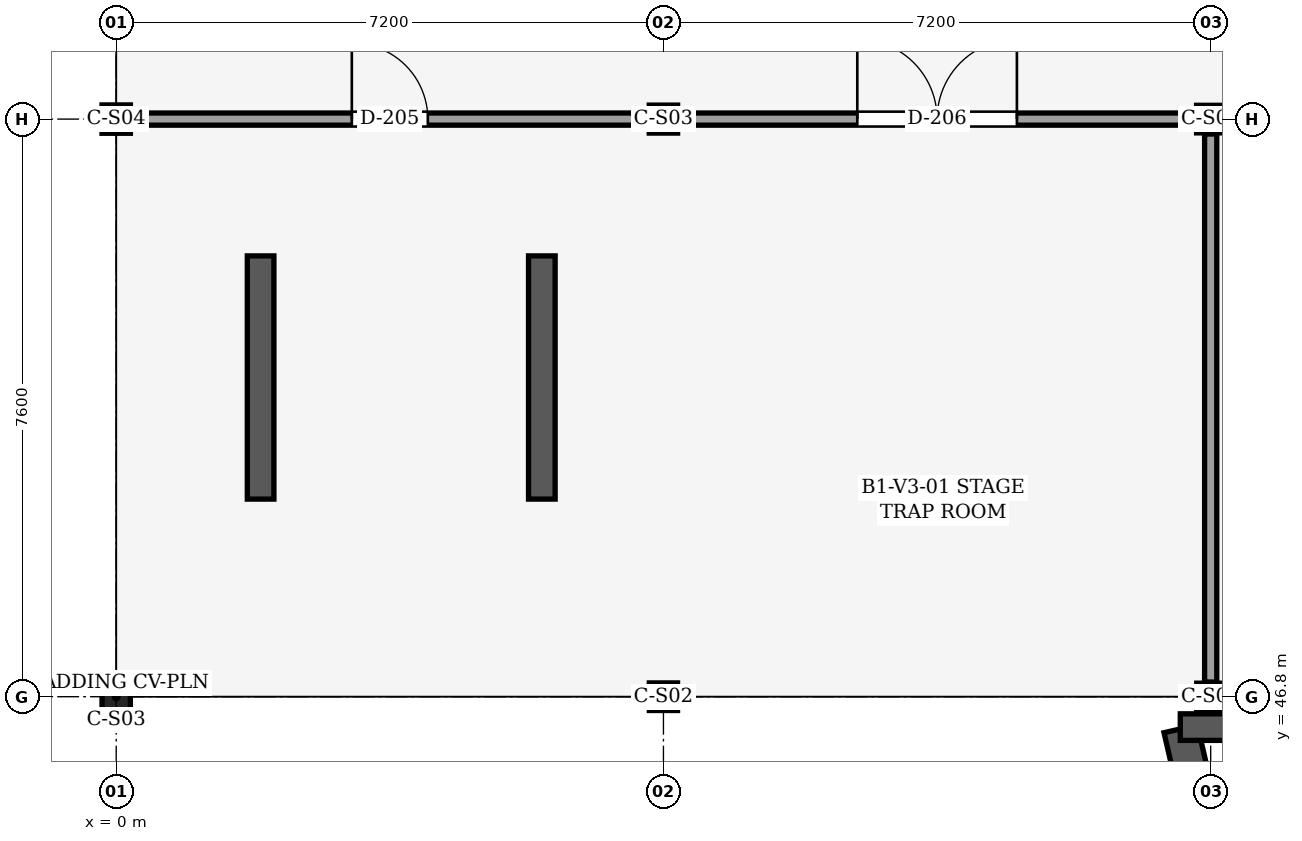
"""IFC4 building model, lengths in metres.
Left out: names, types, materials, properties, quantities, classifications, styles, units other than length and angle.
Written with IfcOpenShell. Run it as: python <this file> out.ifc"""

import sys

from ifc_helpers import new_model, si_unit, direction, frame, frame_2d, origin, origin_2d, place, context, subcontext, project, spatial, rectangle, i_section, extrude, element, fill, save


model = new_model("IFC4")
c1 = context("Model", 3, precision=1e-05, world=origin(), true_north=direction((0.0, 1.0)))
c2 = subcontext(c1, "Body", "Model", "MODEL_VIEW")
j1 = project(units=[si_unit("LENGTHUNIT", "METRE"), si_unit("PLANEANGLEUNIT", "RADIAN")], contexts=[c1])
p1 = place(None, origin())
s1 = spatial("IfcSite", under=j1, at=p1, CompositionType="ELEMENT")
p2 = place(p1, origin())
s2 = spatial("IfcBuilding", under=s1, at=p2, CompositionType="ELEMENT")
p3 = place(p2, frame((0.0, 0.0, -5.4)))
s3 = spatial("IfcBuildingStorey", under=s2, at=p3, CompositionType="ELEMENT", Elevation=-5.4)
p4 = place(p3, frame((0.0, 46.8, 0.0), z_axis=(0.0, 0.0, 1.0), x_axis=(1.0, 0.0, 0.0)))
e1 = element("IfcColumn", 1, at=p4, inside=s3, PredefinedType="COLUMN", context=c2, shape_type="SweptSolid", body=[
    extrude(i_section(OverallWidth=0.373, OverallDepth=0.368, WebThickness=0.015, FlangeThickness=0.024, FilletRadius=0.025, at=origin_2d()), origin(), (0.0, 0.0, 1.0), 5.4),
])
p5 = place(p3, frame((0.0, 54.4, 0.0), z_axis=(0.0, 0.0, 1.0), x_axis=(1.0, 0.0, 0.0)))
e2 = element("IfcColumn", 2, at=p5, inside=s3, PredefinedType="COLUMN", context=c2, shape_type="SweptSolid", body=[
    extrude(i_section(OverallWidth=0.373, OverallDepth=0.373, WebThickness=0.016, FlangeThickness=0.026, FilletRadius=0.025, at=origin_2d()), origin(), (0.0, 0.0, 1.0), 5.4),
])
p6 = place(p3, frame((7.2, 46.8, 0.0), z_axis=(0.0, 0.0, 1.0), x_axis=(1.0, 0.0, 0.0)))
e3 = element("IfcColumn", 3, at=p6, inside=s3, PredefinedType="COLUMN", context=c2, shape_type="SweptSolid", body=[
    extrude(i_section(OverallWidth=0.371, OverallDepth=0.363, WebThickness=0.013, FlangeThickness=0.022, FilletRadius=0.025, at=origin_2d()), origin(), (0.0, 0.0, 1.0), 5.4),
])
p7 = place(p3, frame((7.2, 54.4, 0.0), z_axis=(0.0, 0.0, 1.0), x_axis=(1.0, 0.0, 0.0)))
e4 = element("IfcColumn", 4, at=p7, inside=s3, PredefinedType="COLUMN", context=c2, shape_type="SweptSolid", body=[
    extrude(i_section(OverallWidth=0.373, OverallDepth=0.368, WebThickness=0.015, FlangeThickness=0.024, FilletRadius=0.025, at=origin_2d()), origin(), (0.0, 0.0, 1.0), 5.4),
])
p8 = place(p3, frame((14.4, 46.8, 0.0), z_axis=(0.0, 0.0, 1.0), x_axis=(1.0, 0.0, 0.0)))
e5 = element("IfcColumn", 5, at=p8, inside=s3, PredefinedType="COLUMN", context=c2, shape_type="SweptSolid", body=[
    extrude(i_section(OverallWidth=0.368, OverallDepth=0.356, WebThickness=0.011, FlangeThickness=0.018, FilletRadius=0.025, at=origin_2d()), origin(), (0.0, 0.0, 1.0), 5.4),
])
p9 = place(p3, frame((14.4, 54.4, 0.0), z_axis=(0.0, 0.0, 1.0), x_axis=(1.0, 0.0, 0.0)))
e6 = element("IfcColumn", 6, at=p9, inside=s3, PredefinedType="COLUMN", context=c2, shape_type="SweptSolid", body=[
    extrude(i_section(OverallWidth=0.371, OverallDepth=0.363, WebThickness=0.013, FlangeThickness=0.022, FilletRadius=0.025, at=origin_2d()), origin(), (0.0, 0.0, 1.0), 5.4),
])
p10 = place(p3, frame((14.005, 46.377, -0.45), z_axis=(0.0, 0.0, 1.0), x_axis=(0.224861740746, -0.974390680143, 0.0)))
e7 = element("IfcWall", 7, at=p10, inside=s3, PredefinedType="USERDEFINED", context=c2, shape_type="SweptSolid", body=[
    extrude(rectangle(XDim=7.981, YDim=0.45, at=frame_2d((3.991, 0.0))), origin(), (0.0, 0.0, 1.0), 5.6),
])
p11 = place(p3, frame((21.45, 46.4, -0.45), z_axis=(0.0, 0.0, 1.0), x_axis=(-1.0, 0.0, 0.0)))
e8 = element("IfcWall", 8, at=p11, inside=s3, PredefinedType="USERDEFINED", context=c2, shape_type="SweptSolid", body=[
    extrude(rectangle(XDim=7.45, YDim=0.35, at=frame_2d((3.725, 0.0))), origin(), (0.0, 0.0, 1.0), 5.6),
])
for number, where, z_axis, x_axis in (
    (9, (1.9, 49.4, 0.0), (0.0, 0.0, 1.0), (0.0, 1.0, 0.0)),
    (10, (5.6, 49.4, 0.0), (0.0, 0.0, 1.0), (0.0, 1.0, 0.0)),
):
    element("IfcWall", number, at=place(p3, frame(where, z_axis=z_axis, x_axis=x_axis)), inside=s3, PredefinedType="USERDEFINED", context=c2, shape_type="SweptSolid", body=[
        extrude(rectangle(XDim=3.2, YDim=0.35, at=frame_2d((1.6, 0.0))), origin(), (0.0, 0.0, 1.0), 5.12),
    ])
p12 = place(p3, frame((0.201, 54.4, 0.0), z_axis=(0.0, 0.0, 1.0), x_axis=(1.0, 0.0, 0.0)))
e11 = element("IfcWall", 11, at=p12, inside=s3, PredefinedType="PARTITIONING", context=c2, shape_type="SweptSolid", body=[
    extrude(rectangle(XDim=6.797, YDim=0.16, at=frame_2d((3.398, 0.0))), origin(), (0.0, 0.0, 1.0), 4.493),
])
p13 = place(p12, frame((2.898, 0.0, 0.0)))
e12 = element("IfcOpeningElement", 12, at=p13, cuts=e11, PredefinedType="OPENING", context=c2, shape_type="SweptSolid", body=[
    extrude(rectangle(XDim=1.0, YDim=2.15, at=frame_2d((0.5, 1.075))), frame((0.0, 0.09, 0.0), z_axis=(0.0, -1.0, 0.0), x_axis=(1.0, 0.0, 0.0)), (0.0, 0.0, 1.0), 0.18),
])
p14 = place(p3, frame((7.402, 54.4, 0.0), z_axis=(0.0, 0.0, 1.0), x_axis=(1.0, 0.0, 0.0)))
e13 = element("IfcWall", 13, at=p14, inside=s3, PredefinedType="PARTITIONING", context=c2, shape_type="SweptSolid", body=[
    extrude(rectangle(XDim=6.798, YDim=0.16, at=frame_2d((3.399, 0.0))), origin(), (0.0, 0.0, 1.0), 4.551),
])
p15 = place(p14, frame((2.349, 0.0, 0.0)))
e14 = element("IfcOpeningElement", 14, at=p15, cuts=e13, PredefinedType="OPENING", context=c2, shape_type="SweptSolid", body=[
    extrude(rectangle(XDim=2.1, YDim=2.5, at=frame_2d((1.05, 1.25))), frame((0.0, 0.09, 0.0), z_axis=(0.0, -1.0, 0.0), x_axis=(1.0, 0.0, 0.0)), (0.0, 0.0, 1.0), 0.18),
])
p16 = place(p3, frame((14.4, 46.993, 0.0), z_axis=(0.0, 0.0, 1.0), x_axis=(0.0, 1.0, 0.0)))
e15 = element("IfcWall", 15, at=p16, inside=s3, PredefinedType="PARTITIONING", context=c2, shape_type="SweptSolid", body=[
    extrude(rectangle(XDim=7.211, YDim=0.16, at=frame_2d((3.605, 0.0))), origin(), (0.0, 0.0, 1.0), 4.493),
])
p17 = place(p13, origin())
e16 = element("IfcDoor", 16, at=p17, inside=s3, OperationType="SINGLE_SWING_LEFT", PredefinedType="DOOR", context=c2, shape_type="SweptSolid", body=[
    extrude(rectangle(XDim=1.0, YDim=2.15, at=frame_2d((0.5, 1.075))), frame((0.0, 0.025, 0.0), z_axis=(0.0, -1.0, 0.0), x_axis=(1.0, 0.0, 0.0)), (0.0, 0.0, 1.0), 0.05),
])
fill(e12, e16)
p18 = place(p15, origin())
e17 = element("IfcDoor", 17, at=p18, inside=s3, OperationType="DOUBLE_DOOR_SINGLE_SWING", PredefinedType="DOOR", context=c2, shape_type="SweptSolid", body=[
    extrude(rectangle(XDim=2.1, YDim=2.5, at=frame_2d((1.05, 1.25))), frame((0.0, 0.025, 0.0), z_axis=(0.0, -1.0, 0.0), x_axis=(1.0, 0.0, 0.0)), (0.0, 0.0, 1.0), 0.05),
])
fill(e14, e17)
save(model, sys.argv[1])
